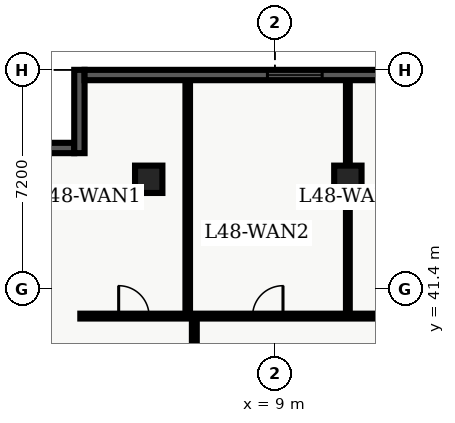
"""IFC4 building model, lengths in metres.
Left out: names, types, materials, properties, quantities, classifications, styles, units other than length and angle.
Written with IfcOpenShell. Run it as: python <this file> out.ifc"""

import sys

from ifc_helpers import new_model, entity, si_unit, converted_unit, direction, frame, origin_with_axes, origin_2d_with_axis, place, context, subcontext, project, spatial, polyline, rectangle, outline, extrude, element, fill, save


model = new_model("IFC4")
c1 = context("Model", 3, precision=1e-05, world=origin_with_axes(), true_north=direction((0.0, 1.0)))
c2 = subcontext(c1, "Body", "Model", "MODEL_VIEW")
j1 = project(units=[si_unit("LENGTHUNIT", "METRE"), converted_unit("PLANEANGLEUNIT", "DEGREE", entity("IfcPlaneAngleMeasure", 0.017), si_unit("PLANEANGLEUNIT", "RADIAN"), dimensions=[0, 0, 0, 0, 0, 0, 0])], contexts=[c1])
p1 = place(None, origin_with_axes())
s1 = spatial("IfcSite", under=j1, at=p1, CompositionType="ELEMENT")
p2 = place(p1, origin_with_axes())
s2 = spatial("IfcBuilding", under=s1, at=p2, CompositionType="ELEMENT")
p3 = place(p2, frame((0.0, 0.0, 196.5), z_axis=(0.0, 0.0, 1.0), x_axis=(1.0, 0.0, 0.0)))
s3 = spatial("IfcBuildingStorey", under=s2, at=p3, CompositionType="ELEMENT", Elevation=196.5)
for number, where, z_axis, x_axis in (
    (1, (11.4, 45.0, 0.0), (0.0, 0.0, 1.0), (1.0, 0.0, 0.0)),
    (2, (4.85, 45.0, 0.0), (0.0, 0.0, 1.0), (1.0, 0.0, 0.0)),
):
    element("IfcColumn", number, at=place(p3, frame(where, z_axis=z_axis, x_axis=x_axis)), inside=s3, PredefinedType="COLUMN", context=c2, shape_type="SweptSolid", body=[
        extrude(rectangle(XDim=0.9, YDim=0.9, at=origin_2d_with_axis()), origin_with_axes(), (0.0, 0.0, 1.0), 3.9),
    ])
p4 = place(p3, frame((2.6, 40.5, 0.0), z_axis=(0.0, 0.0, 1.0), x_axis=(1.0, 0.0, 0.0)))
e3 = element("IfcWall", 3, at=p4, inside=s3, PredefinedType="PARTITIONING", context=c2, shape_type="SweptSolid", body=[
    extrude(outline(polyline([(0.0, -0.08), (25.444, -0.08), (25.444, 0.08), (0.0, 0.08), (0.0, -0.08)])), origin_with_axes(), (0.0, 0.0, 1.0), 2.7),
])
p5 = place(p4, frame((1.762, 0.0, 0.0), z_axis=(0.0, 0.0, 1.0), x_axis=(1.0, 0.0, 0.0)))
e4 = element("IfcOpeningElement", 4, at=p5, cuts=e3, PredefinedType="OPENING", context=c2, shape_type="SweptSolid", body=[
    extrude(rectangle(XDim=1.0, YDim=0.18, at=origin_2d_with_axis()), origin_with_axes(), (0.0, 0.0, 1.0), 2.15),
])
p6 = place(p4, frame((6.167, 0.0, 0.0), z_axis=(0.0, 0.0, 1.0), x_axis=(1.0, 0.0, 0.0)))
e5 = element("IfcOpeningElement", 5, at=p6, cuts=e3, PredefinedType="OPENING", context=c2, shape_type="SweptSolid", body=[
    extrude(rectangle(XDim=1.0, YDim=0.18, at=origin_2d_with_axis()), origin_with_axes(), (0.0, 0.0, 1.0), 2.15),
])
p7 = place(p4, frame((10.413, 0.0, 0.0), z_axis=(0.0, 0.0, 1.0), x_axis=(1.0, 0.0, 0.0)))
e6 = element("IfcOpeningElement", 6, at=p7, cuts=e3, PredefinedType="OPENING", context=c2, shape_type="SweptSolid", body=[
    extrude(rectangle(XDim=1.0, YDim=0.18, at=origin_2d_with_axis()), origin_with_axes(), (0.0, 0.0, 1.0), 2.15),
])
p8 = place(p4, frame((14.773, 0.0, 0.0), z_axis=(0.0, 0.0, 1.0), x_axis=(1.0, 0.0, 0.0)))
e7 = element("IfcOpeningElement", 7, at=p8, cuts=e3, PredefinedType="OPENING", context=c2, shape_type="SweptSolid", body=[
    extrude(rectangle(XDim=1.0, YDim=0.18, at=origin_2d_with_axis()), origin_with_axes(), (0.0, 0.0, 1.0), 2.15),
])
p9 = place(p3, frame((6.35, 7.8, 0.0), z_axis=(0.0, 0.0, 1.0), x_axis=(0.0, 1.0, 0.0)))
e8 = element("IfcWall", 8, at=p9, inside=s3, PredefinedType="PARTITIONING", context=c2, shape_type="SweptSolid", body=[
    extrude(outline(polyline([(0.0, -0.08), (32.7, -0.08), (32.7, 0.08), (0.0, 0.08), (0.0, -0.08)])), origin_with_axes(), (0.0, 0.0, 1.0), 2.7),
])
p10 = place(p9, frame((0.8, 0.0, 0.0), z_axis=(0.0, 0.0, 1.0), x_axis=(1.0, 0.0, 0.0)))
e9 = element("IfcOpeningElement", 9, at=p10, cuts=e8, PredefinedType="OPENING", context=c2, shape_type="SweptSolid", body=[
    extrude(rectangle(XDim=1.0, YDim=0.18, at=origin_2d_with_axis()), origin_with_axes(), (0.0, 0.0, 1.0), 2.15),
])
p11 = place(p9, frame((6.971, 0.0, 0.0), z_axis=(0.0, 0.0, 1.0), x_axis=(1.0, 0.0, 0.0)))
e10 = element("IfcOpeningElement", 10, at=p11, cuts=e8, PredefinedType="OPENING", context=c2, shape_type="SweptSolid", body=[
    extrude(rectangle(XDim=1.0, YDim=0.18, at=origin_2d_with_axis()), origin_with_axes(), (0.0, 0.0, 1.0), 2.15),
])
p12 = place(p9, frame((12.598, 0.0, 0.0), z_axis=(0.0, 0.0, 1.0), x_axis=(1.0, 0.0, 0.0)))
e11 = element("IfcOpeningElement", 11, at=p12, cuts=e8, PredefinedType="OPENING", context=c2, shape_type="SweptSolid", body=[
    extrude(rectangle(XDim=1.0, YDim=0.18, at=origin_2d_with_axis()), origin_with_axes(), (0.0, 0.0, 1.0), 2.15),
])
p13 = place(p9, frame((19.386, 0.0, 0.0), z_axis=(0.0, 0.0, 1.0), x_axis=(1.0, 0.0, 0.0)))
e12 = element("IfcOpeningElement", 12, at=p13, cuts=e8, PredefinedType="OPENING", context=c2, shape_type="SweptSolid", body=[
    extrude(rectangle(XDim=1.0, YDim=0.18, at=origin_2d_with_axis()), origin_with_axes(), (0.0, 0.0, 1.0), 2.15),
])
p14 = place(p9, frame((27.82, 0.0, 0.0), z_axis=(0.0, 0.0, 1.0), x_axis=(1.0, 0.0, 0.0)))
e13 = element("IfcOpeningElement", 13, at=p14, cuts=e8, PredefinedType="OPENING", context=c2, shape_type="SweptSolid", body=[
    extrude(rectangle(XDim=1.0, YDim=0.18, at=origin_2d_with_axis()), origin_with_axes(), (0.0, 0.0, 1.0), 2.15),
])
p15 = place(p3, frame((6.133, 40.6, 0.0), z_axis=(0.0, 0.0, 1.0), x_axis=(0.0, 1.0, 0.0)))
e14 = element("IfcWall", 14, at=p15, inside=s3, PredefinedType="PARTITIONING", context=c2, shape_type="SweptSolid", body=[
    extrude(outline(polyline([(0.0, -0.075), (7.665, -0.075), (7.665, 0.075), (0.0, 0.075), (0.0, -0.075)])), origin_with_axes(), (0.0, 0.0, 1.0), 2.7),
])
p16 = place(p3, frame((11.4, 40.6, 0.0), z_axis=(0.0, 0.0, 1.0), x_axis=(0.0, 1.0, 0.0)))
e15 = element("IfcWall", 15, at=p16, inside=s3, PredefinedType="PARTITIONING", context=c2, shape_type="SweptSolid", body=[
    extrude(outline(polyline([(0.0, -0.062), (7.665, -0.062), (7.665, 0.062), (0.0, 0.062), (0.0, -0.062)])), origin_with_axes(), (0.0, 0.0, 1.0), 2.7),
])
p17 = place(p3, frame((0.34, 46.03, 0.0), z_axis=(0.0, 0.0, 1.0), x_axis=(1.0, 0.0, 0.0)))
e16 = element("IfcWall", 16, at=p17, inside=s3, PredefinedType="SOLIDWALL", context=c2, shape_type="SweptSolid", body=[
    extrude(outline(polyline([(0.0, -0.17), (2.06, -0.17), (2.06, 0.17), (0.0, 0.17), (0.0, -0.17)])), origin_with_axes(), (0.0, 0.0, 1.0), 3.66),
])
p18 = place(p3, frame((2.57, 45.86, 0.0), z_axis=(0.0, 0.0, 1.0), x_axis=(0.0, 1.0, 0.0)))
e17 = element("IfcWall", 17, at=p18, inside=s3, PredefinedType="SOLIDWALL", context=c2, shape_type="SweptSolid", body=[
    extrude(outline(polyline([(0.0, -0.17), (2.74, -0.17), (2.74, 0.17), (0.0, 0.17), (0.0, -0.17)])), origin_with_axes(), (0.0, 0.0, 1.0), 3.66),
])
p19 = place(p3, frame((2.74, 48.43, 0.0), z_axis=(0.0, 0.0, 1.0), x_axis=(1.0, 0.0, 0.0)))
e18 = element("IfcWall", 18, at=p19, inside=s3, PredefinedType="SOLIDWALL", context=c2, shape_type="SweptSolid", body=[
    extrude(outline(polyline([(0.0, -0.17), (19.239, -0.17), (19.239, 0.17), (0.0, 0.17), (0.0, -0.17)])), origin_with_axes(), (0.0, 0.0, 1.0), 3.66),
])
p20 = place(p19, frame((6.915, 0.0, 0.45), z_axis=(0.0, 0.0, 1.0), x_axis=(1.0, 0.0, 0.0)))
e19 = element("IfcOpeningElement", 19, at=p20, cuts=e18, PredefinedType="OPENING", context=c2, shape_type="SweptSolid", body=[
    extrude(rectangle(XDim=1.8, YDim=0.36, at=origin_2d_with_axis()), origin_with_axes(), (0.0, 0.0, 1.0), 2.1),
])
p21 = place(p19, frame((16.384, 0.0, 0.45), z_axis=(0.0, 0.0, 1.0), x_axis=(1.0, 0.0, 0.0)))
e20 = element("IfcOpeningElement", 20, at=p21, cuts=e18, PredefinedType="OPENING", context=c2, shape_type="SweptSolid", body=[
    extrude(rectangle(XDim=1.8, YDim=0.36, at=origin_2d_with_axis()), origin_with_axes(), (0.0, 0.0, 1.0), 2.1),
])
p22 = place(p4, frame((1.762, 0.0, 0.0), z_axis=(0.0, 0.0, 1.0), x_axis=(1.0, 0.0, 0.0)))
e21 = element("IfcDoor", 21, at=p22, inside=s3, OperationType="SINGLE_SWING_LEFT", PredefinedType="DOOR", context=c2, shape_type="SweptSolid", body=[
    extrude(rectangle(XDim=1.0, YDim=0.09, at=origin_2d_with_axis()), origin_with_axes(), (0.0, 0.0, 1.0), 2.15),
])
fill(e4, e21)
p23 = place(p4, frame((6.167, 0.0, 0.0), z_axis=(0.0, 0.0, 1.0), x_axis=(1.0, 0.0, 0.0)))
e22 = element("IfcDoor", 22, at=p23, inside=s3, OperationType="SINGLE_SWING_RIGHT", PredefinedType="DOOR", context=c2, shape_type="SweptSolid", body=[
    extrude(rectangle(XDim=1.0, YDim=0.09, at=origin_2d_with_axis()), origin_with_axes(), (0.0, 0.0, 1.0), 2.15),
])
fill(e5, e22)
p24 = place(p19, frame((6.915, 0.0, 0.45), z_axis=(0.0, 0.0, 1.0), x_axis=(1.0, 0.0, 0.0)))
e23 = element("IfcWindow", 23, at=p24, inside=s3, PredefinedType="WINDOW", context=c2, shape_type="SweptSolid", body=[
    extrude(rectangle(XDim=1.8, YDim=0.09, at=origin_2d_with_axis()), origin_with_axes(), (0.0, 0.0, 1.0), 2.1),
])
fill(e19, e23)
save(model, sys.argv[1])
